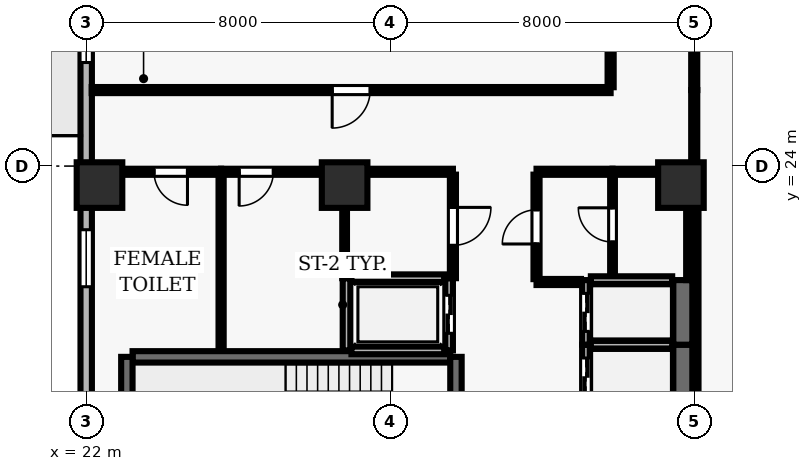
"""IFC4 building model, lengths in metres.
Left out: names, types, materials, properties, quantities, classifications, styles, units other than length and angle.
Written with IfcOpenShell. Run it as: python <this file> out.ifc"""

import sys

from ifc_helpers import new_model, si_unit, direction, frame, frame_2d, origin, origin_2d, place, context, subcontext, project, spatial, rectangle, extrude, element, fill, save


model = new_model("IFC4")
c1 = context("Model", 3, precision=1e-05, world=origin(), true_north=direction((0.0, 1.0)))
c2 = subcontext(c1, "Body", "Model", "MODEL_VIEW")
j1 = project(units=[si_unit("LENGTHUNIT", "METRE"), si_unit("PLANEANGLEUNIT", "RADIAN")], contexts=[c1])
p1 = place(None, origin())
s1 = spatial("IfcSite", under=j1, at=p1, CompositionType="ELEMENT")
p2 = place(p1, origin())
s2 = spatial("IfcBuilding", under=s1, at=p2, CompositionType="ELEMENT")
p3 = place(p2, frame((0.0, 0.0, 107.3)))
s3 = spatial("IfcBuildingStorey", under=s2, at=p3, CompositionType="ELEMENT", Elevation=107.3)
for number, where, z_axis, x_axis in (
    (1, (22.35, 23.5, 0.0), (0.0, 0.0, 1.0), (1.0, 0.0, 0.0)),
    (2, (28.8, 23.5, 0.0), (0.0, 0.0, 1.0), (1.0, 0.0, 0.0)),
    (3, (37.65, 23.5, 0.0), (0.0, 0.0, 1.0), (1.0, 0.0, 0.0)),
):
    element("IfcColumn", number, at=place(p3, frame(where, z_axis=z_axis, x_axis=x_axis)), inside=s3, PredefinedType="COLUMN", context=c2, shape_type="SweptSolid", body=[
        extrude(rectangle(XDim=1.2, YDim=1.2, at=origin_2d()), origin(), (0.0, 0.0, 1.0), 3.9),
    ])
p4 = place(p3, frame((22.0, 46.1, 0.0), z_axis=(0.0, 0.0, 1.0), x_axis=(0.0, -1.0, 0.0)))
e4 = element("IfcWall", 4, at=p4, inside=s3, PredefinedType="SOLIDWALL", context=c2, shape_type="SweptSolid", body=[
    extrude(rectangle(XDim=43.6, YDim=0.3, at=frame_2d((21.8, 0.0))), origin(), (0.0, 0.0, 1.0), 3.69),
])
p5 = place(p4, frame((7.1, 0.0, 0.0)))
e5 = element("IfcOpeningElement", 5, at=p5, cuts=e4, PredefinedType="OPENING", context=c2, shape_type="SweptSolid", body=[
    extrude(rectangle(XDim=1.0, YDim=2.2, at=frame_2d((0.5, 1.1))), frame((0.0, 0.16, 0.0), z_axis=(0.0, -1.0, 0.0), x_axis=(1.0, 0.0, 0.0)), (0.0, 0.0, 1.0), 0.32),
])
p6 = place(p4, frame((1.975, 0.0, 0.9)))
e6 = element("IfcOpeningElement", 6, at=p6, cuts=e4, PredefinedType="OPENING", context=c2, shape_type="SweptSolid", body=[
    extrude(rectangle(XDim=1.5, YDim=1.6, at=frame_2d((0.75, 0.8))), frame((0.0, 0.16, 0.0), z_axis=(0.0, -1.0, 0.0), x_axis=(1.0, 0.0, 0.0)), (0.0, 0.0, 1.0), 0.32),
])
p7 = place(p4, frame((13.325, 0.0, 0.9)))
e7 = element("IfcOpeningElement", 7, at=p7, cuts=e4, PredefinedType="OPENING", context=c2, shape_type="SweptSolid", body=[
    extrude(rectangle(XDim=1.5, YDim=1.6, at=frame_2d((0.75, 0.8))), frame((0.0, 0.16, 0.0), z_axis=(0.0, -1.0, 0.0), x_axis=(1.0, 0.0, 0.0)), (0.0, 0.0, 1.0), 0.32),
])
p8 = place(p4, frame((17.875, 0.0, 0.9)))
e8 = element("IfcOpeningElement", 8, at=p8, cuts=e4, PredefinedType="OPENING", context=c2, shape_type="SweptSolid", body=[
    extrude(rectangle(XDim=1.5, YDim=1.6, at=frame_2d((0.75, 0.8))), frame((0.0, 0.16, 0.0), z_axis=(0.0, -1.0, 0.0), x_axis=(1.0, 0.0, 0.0)), (0.0, 0.0, 1.0), 0.32),
])
p9 = place(p4, frame((23.775, 0.0, 0.9)))
e9 = element("IfcOpeningElement", 9, at=p9, cuts=e4, PredefinedType="OPENING", context=c2, shape_type="SweptSolid", body=[
    extrude(rectangle(XDim=1.5, YDim=1.6, at=frame_2d((0.75, 0.8))), frame((0.0, 0.16, 0.0), z_axis=(0.0, -1.0, 0.0), x_axis=(1.0, 0.0, 0.0)), (0.0, 0.0, 1.0), 0.32),
])
p10 = place(p4, frame((28.775, 0.0, 0.9)))
e10 = element("IfcOpeningElement", 10, at=p10, cuts=e4, PredefinedType="OPENING", context=c2, shape_type="SweptSolid", body=[
    extrude(rectangle(XDim=1.5, YDim=1.6, at=frame_2d((0.75, 0.8))), frame((0.0, 0.16, 0.0), z_axis=(0.0, -1.0, 0.0), x_axis=(1.0, 0.0, 0.0)), (0.0, 0.0, 1.0), 0.32),
])
p11 = place(p4, frame((34.675, 0.0, 0.9)))
e11 = element("IfcOpeningElement", 11, at=p11, cuts=e4, PredefinedType="OPENING", context=c2, shape_type="SweptSolid", body=[
    extrude(rectangle(XDim=1.5, YDim=1.6, at=frame_2d((0.75, 0.8))), frame((0.0, 0.16, 0.0), z_axis=(0.0, -1.0, 0.0), x_axis=(1.0, 0.0, 0.0)), (0.0, 0.0, 1.0), 0.32),
])
p12 = place(p3, frame((31.58, 18.98, 0.0), z_axis=(0.0, 0.0, 1.0), x_axis=(-1.0, 0.0, 0.0)))
e12 = element("IfcWall", 12, at=p12, inside=s3, PredefinedType="SHEAR", context=c2, shape_type="SweptSolid", body=[
    extrude(rectangle(XDim=8.36, YDim=0.3, at=frame_2d((4.18, 0.0))), origin(), (0.0, 0.0, 1.0), 3.69),
])
p13 = place(p3, frame((23.07, 18.98, 0.0), z_axis=(0.0, 0.0, 1.0), x_axis=(0.0, -1.0, 0.0)))
e13 = element("IfcWall", 13, at=p13, inside=s3, PredefinedType="SHEAR", context=c2, shape_type="SweptSolid", body=[
    extrude(rectangle(XDim=3.51, YDim=0.3, at=frame_2d((1.755, 0.0))), origin(), (0.0, 0.0, 1.0), 3.69),
])
p14 = place(p3, frame((31.73, 15.47, 0.0), z_axis=(0.0, 0.0, 1.0), x_axis=(0.0, 1.0, 0.0)))
e14 = element("IfcWall", 14, at=p14, inside=s3, PredefinedType="SHEAR", context=c2, shape_type="SweptSolid", body=[
    extrude(rectangle(XDim=3.51, YDim=0.3, at=frame_2d((1.755, 0.0))), origin(), (0.0, 0.0, 1.0), 3.69),
])
p15 = place(p14, frame((1.18, 0.0, 0.0)))
e15 = element("IfcOpeningElement", 15, at=p15, cuts=e14, PredefinedType="OPENING", context=c2, shape_type="SweptSolid", body=[
    extrude(rectangle(XDim=1.15, YDim=2.15, at=frame_2d((0.575, 1.075))), frame((0.0, 0.16, 0.0), z_axis=(0.0, -1.0, 0.0), x_axis=(1.0, 0.0, 0.0)), (0.0, 0.0, 1.0), 0.32),
])
p16 = place(p3, frame((35.15, 19.3, 0.0), z_axis=(0.0, 0.0, 1.0), x_axis=(0.0, -1.0, 0.0)))
e16 = element("IfcWall", 16, at=p16, inside=s3, PredefinedType="SOLIDWALL", context=c2, shape_type="SweptSolid", body=[
    extrude(rectangle(XDim=1.7, YDim=0.2, at=frame_2d((0.85, 0.0))), origin(), (0.0, 0.0, 1.0), 3.69),
])
p17 = place(p16, frame((0.35, 0.0, 0.0)))
e17 = element("IfcOpeningElement", 17, at=p17, cuts=e16, PredefinedType="OPENING", context=c2, shape_type="SweptSolid", body=[
    extrude(rectangle(XDim=1.0, YDim=2.1, at=frame_2d((0.5, 1.05))), frame((0.0, 0.11, 0.0), z_axis=(0.0, -1.0, 0.0), x_axis=(1.0, 0.0, 0.0)), (0.0, 0.0, 1.0), 0.22),
])
p18 = place(p3, frame((37.7, 17.6, 0.0), z_axis=(0.0, 0.0, 1.0), x_axis=(0.0, 1.0, 0.0)))
e18 = element("IfcWall", 18, at=p18, inside=s3, PredefinedType="SHEAR", context=c2, shape_type="SweptSolid", body=[
    extrude(rectangle(XDim=1.7, YDim=0.5, at=frame_2d((0.85, 0.0))), origin(), (0.0, 0.0, 1.0), 3.69),
])
p19 = place(p3, frame((37.42, 19.3, 0.0), z_axis=(0.0, 0.0, 1.0), x_axis=(-1.0, 0.0, 0.0)))
e19 = element("IfcWall", 19, at=p19, inside=s3, PredefinedType="SOLIDWALL", context=c2, shape_type="SweptSolid", body=[
    extrude(rectangle(XDim=2.14, YDim=0.2, at=frame_2d((1.07, 0.0))), origin(), (0.0, 0.0, 1.0), 3.69),
])
p20 = place(p3, frame((35.15, 21.0, 0.0), z_axis=(0.0, 0.0, 1.0), x_axis=(0.0, -1.0, 0.0)))
e20 = element("IfcWall", 20, at=p20, inside=s3, PredefinedType="SOLIDWALL", context=c2, shape_type="SweptSolid", body=[
    extrude(rectangle(XDim=1.7, YDim=0.2, at=frame_2d((0.85, 0.0))), origin(), (0.0, 0.0, 1.0), 3.69),
])
p21 = place(p20, frame((0.35, 0.0, 0.0)))
e21 = element("IfcOpeningElement", 21, at=p21, cuts=e20, PredefinedType="OPENING", context=c2, shape_type="SweptSolid", body=[
    extrude(rectangle(XDim=1.0, YDim=2.1, at=frame_2d((0.5, 1.05))), frame((0.0, 0.11, 0.0), z_axis=(0.0, -1.0, 0.0), x_axis=(1.0, 0.0, 0.0)), (0.0, 0.0, 1.0), 0.22),
])
p22 = place(p3, frame((37.7, 19.3, 0.0), z_axis=(0.0, 0.0, 1.0), x_axis=(0.0, 1.0, 0.0)))
e22 = element("IfcWall", 22, at=p22, inside=s3, PredefinedType="SHEAR", context=c2, shape_type="SweptSolid", body=[
    extrude(rectangle(XDim=1.7, YDim=0.5, at=frame_2d((0.85, 0.0))), origin(), (0.0, 0.0, 1.0), 3.69),
])
p23 = place(p3, frame((37.42, 21.0, 0.0), z_axis=(0.0, 0.0, 1.0), x_axis=(-1.0, 0.0, 0.0)))
e23 = element("IfcWall", 23, at=p23, inside=s3, PredefinedType="SOLIDWALL", context=c2, shape_type="SweptSolid", body=[
    extrude(rectangle(XDim=2.14, YDim=0.2, at=frame_2d((1.07, 0.0))), origin(), (0.0, 0.0, 1.0), 3.69),
])
p24 = place(p3, frame((28.85, 21.05, 0.0), z_axis=(0.0, 0.0, 1.0), x_axis=(0.0, -1.0, 0.0)))
e24 = element("IfcWall", 24, at=p24, inside=s3, PredefinedType="SOLIDWALL", context=c2, shape_type="SweptSolid", body=[
    extrude(rectangle(XDim=1.9, YDim=0.2, at=frame_2d((0.95, 0.0))), origin(), (0.0, 0.0, 1.0), 3.69),
])
p25 = place(p3, frame((31.55, 19.15, 0.0), z_axis=(0.0, 0.0, 1.0), x_axis=(0.0, 1.0, 0.0)))
e25 = element("IfcWall", 25, at=p25, inside=s3, PredefinedType="SOLIDWALL", context=c2, shape_type="SweptSolid", body=[
    extrude(rectangle(XDim=1.9, YDim=0.2, at=frame_2d((0.95, 0.0))), origin(), (0.0, 0.0, 1.0), 3.69),
])
p26 = place(p25, frame((0.45, 0.0, 0.0)))
e26 = element("IfcOpeningElement", 26, at=p26, cuts=e25, PredefinedType="OPENING", context=c2, shape_type="SweptSolid", body=[
    extrude(rectangle(XDim=1.0, YDim=2.1, at=frame_2d((0.5, 1.05))), frame((0.0, 0.11, 0.0), z_axis=(0.0, -1.0, 0.0), x_axis=(1.0, 0.0, 0.0)), (0.0, 0.0, 1.0), 0.22),
])
for number, where, z_axis, x_axis in (
    (27, (28.98, 19.15, 0.0), (0.0, 0.0, 1.0), (1.0, 0.0, 0.0)),
    (28, (31.42, 21.05, 0.0), (0.0, 0.0, 1.0), (-1.0, 0.0, 0.0)),
):
    element("IfcWall", number, at=place(p3, frame(where, z_axis=z_axis, x_axis=x_axis)), inside=s3, PredefinedType="SOLIDWALL", context=c2, shape_type="SweptSolid", body=[
        extrude(rectangle(XDim=2.44, YDim=0.2, at=frame_2d((1.22, 0.0))), origin(), (0.0, 0.0, 1.0), 3.69),
    ])
p27 = place(p3, frame((25.55, 23.85, 0.0), z_axis=(0.0, 0.0, 1.0), x_axis=(-1.0, 0.0, 0.0)))
e29 = element("IfcWall", 29, at=p27, inside=s3, PredefinedType="PARTITIONING", context=c2, shape_type="SweptSolid", body=[
    extrude(rectangle(XDim=3.35, YDim=0.16, at=frame_2d((1.675, 0.0))), origin(), (0.0, 0.0, 1.0), 3.073),
])
p28 = place(p27, frame((0.885, 0.0, 0.0)))
e30 = element("IfcOpeningElement", 30, at=p28, cuts=e29, PredefinedType="OPENING", context=c2, shape_type="SweptSolid", body=[
    extrude(rectangle(XDim=0.88, YDim=2.1, at=frame_2d((0.44, 1.05))), frame((0.0, 0.09, 0.0), z_axis=(0.0, -1.0, 0.0), x_axis=(1.0, 0.0, 0.0)), (0.0, 0.0, 1.0), 0.18),
])
p29 = place(p3, frame((28.8, 23.85, 0.0), z_axis=(0.0, 0.0, 1.0), x_axis=(-1.0, 0.0, 0.0)))
e31 = element("IfcWall", 31, at=p29, inside=s3, PredefinedType="PARTITIONING", context=c2, shape_type="SweptSolid", body=[
    extrude(rectangle(XDim=3.25, YDim=0.16, at=frame_2d((1.625, 0.0))), origin(), (0.0, 0.0, 1.0), 3.073),
])
p30 = place(p29, frame((1.875, 0.0, 0.0)))
e32 = element("IfcOpeningElement", 32, at=p30, cuts=e31, PredefinedType="OPENING", context=c2, shape_type="SweptSolid", body=[
    extrude(rectangle(XDim=0.9, YDim=2.1, at=frame_2d((0.45, 1.05))), frame((0.0, 0.09, 0.0), z_axis=(0.0, -1.0, 0.0), x_axis=(1.0, 0.0, 0.0)), (0.0, 0.0, 1.0), 0.18),
])
p31 = place(p3, frame((31.65, 23.85, 0.0), z_axis=(0.0, 0.0, 1.0), x_axis=(-1.0, 0.0, 0.0)))
e33 = element("IfcWall", 33, at=p31, inside=s3, PredefinedType="PARTITIONING", context=c2, shape_type="SweptSolid", body=[
    extrude(rectangle(XDim=2.85, YDim=0.16, at=frame_2d((1.425, 0.0))), origin(), (0.0, 0.0, 1.0), 3.073),
])
p32 = place(p3, frame((35.02, 20.95, 0.0), z_axis=(0.0, 0.0, 1.0), x_axis=(-1.0, 0.0, 0.0)))
e34 = element("IfcWall", 34, at=p32, inside=s3, PredefinedType="PARTITIONING", context=c2, shape_type="SweptSolid", body=[
    extrude(rectangle(XDim=1.17, YDim=0.16, at=frame_2d((0.585, 0.0))), origin(), (0.0, 0.0, 1.0), 3.69),
])
p33 = place(p3, frame((35.8, 26.0, 0.0), z_axis=(0.0, 0.0, 1.0), x_axis=(-1.0, 0.0, 0.0)))
e35 = element("IfcWall", 35, at=p33, inside=s3, PredefinedType="PARTITIONING", context=c2, shape_type="SweptSolid", body=[
    extrude(rectangle(XDim=13.655, YDim=0.16, at=frame_2d((6.828, 0.0))), origin(), (0.0, 0.0, 1.0), 3.69),
])
p34 = place(p33, frame((6.327, 0.0, 0.0)))
e36 = element("IfcOpeningElement", 36, at=p34, cuts=e35, PredefinedType="OPENING", context=c2, shape_type="SweptSolid", body=[
    extrude(rectangle(XDim=1.0, YDim=2.1, at=frame_2d((0.5, 1.05))), frame((0.0, 0.09, 0.0), z_axis=(0.0, -1.0, 0.0), x_axis=(1.0, 0.0, 0.0)), (0.0, 0.0, 1.0), 0.18),
])
for number, where, z_axis, x_axis in (
    (37, (35.85, 23.85, 0.0), (0.0, 0.0, 1.0), (-1.0, 0.0, 0.0)),
    (38, (37.85, 23.85, 0.0), (0.0, 0.0, 1.0), (-1.0, 0.0, 0.0)),
):
    element("IfcWall", number, at=place(p3, frame(where, z_axis=z_axis, x_axis=x_axis)), inside=s3, PredefinedType="PARTITIONING", context=c2, shape_type="SweptSolid", body=[
        extrude(rectangle(XDim=2.0, YDim=0.16, at=frame_2d((1.0, 0.0))), origin(), (0.0, 0.0, 1.0), 3.073),
    ])
p35 = place(p3, frame((25.55, 19.16, 0.0), z_axis=(0.0, 0.0, 1.0), x_axis=(0.0, 1.0, 0.0)))
e39 = element("IfcWall", 39, at=p35, inside=s3, PredefinedType="PARTITIONING", context=c2, shape_type="SweptSolid", body=[
    extrude(rectangle(XDim=4.615, YDim=0.135, at=frame_2d((2.308, 0.0))), origin(), (0.0, 0.0, 1.0), 3.69),
])
p36 = place(p3, frame((28.8, 23.775, 0.0), z_axis=(0.0, 0.0, 1.0), x_axis=(0.0, -1.0, 0.0)))
e40 = element("IfcWall", 40, at=p36, inside=s3, PredefinedType="PARTITIONING", context=c2, shape_type="SweptSolid", body=[
    extrude(rectangle(XDim=2.725, YDim=0.125, at=frame_2d((1.362, 0.0))), origin(), (0.0, 0.0, 1.0), 3.69),
])
p37 = place(p3, frame((31.65, 23.775, 0.0), z_axis=(0.0, 0.0, 1.0), x_axis=(0.0, -1.0, 0.0)))
e41 = element("IfcWall", 41, at=p37, inside=s3, PredefinedType="PARTITIONING", context=c2, shape_type="SweptSolid", body=[
    extrude(rectangle(XDim=2.725, YDim=0.16, at=frame_2d((1.362, 0.0))), origin(), (0.0, 0.0, 1.0), 3.69),
])
p38 = place(p37, frame((0.862, 0.0, 0.0)))
e42 = element("IfcOpeningElement", 42, at=p38, cuts=e41, PredefinedType="OPENING", context=c2, shape_type="SweptSolid", body=[
    extrude(rectangle(XDim=1.0, YDim=2.1, at=frame_2d((0.5, 1.05))), frame((0.0, 0.09, 0.0), z_axis=(0.0, -1.0, 0.0), x_axis=(1.0, 0.0, 0.0)), (0.0, 0.0, 1.0), 0.18),
])
p39 = place(p3, frame((33.85, 21.025, 0.0), z_axis=(0.0, 0.0, 1.0), x_axis=(0.0, 1.0, 0.0)))
e43 = element("IfcWall", 43, at=p39, inside=s3, PredefinedType="PARTITIONING", context=c2, shape_type="SweptSolid", body=[
    extrude(rectangle(XDim=2.75, YDim=0.16, at=frame_2d((1.375, 0.0))), origin(), (0.0, 0.0, 1.0), 3.69),
])
p40 = place(p39, frame((0.925, 0.0, 0.0)))
e44 = element("IfcOpeningElement", 44, at=p40, cuts=e43, PredefinedType="OPENING", context=c2, shape_type="SweptSolid", body=[
    extrude(rectangle(XDim=0.9, YDim=2.1, at=frame_2d((0.45, 1.05))), frame((0.0, 0.09, 0.0), z_axis=(0.0, -1.0, 0.0), x_axis=(1.0, 0.0, 0.0)), (0.0, 0.0, 1.0), 0.18),
])
p41 = place(p3, frame((35.8, 33.612, 0.0), z_axis=(0.0, 0.0, 1.0), x_axis=(0.0, -1.0, 0.0)))
e45 = element("IfcWall", 45, at=p41, inside=s3, PredefinedType="PARTITIONING", context=c2, shape_type="SweptSolid", body=[
    extrude(rectangle(XDim=7.537, YDim=0.16, at=frame_2d((3.769, 0.0))), origin(), (0.0, 0.0, 1.0), 3.69),
])
p42 = place(p3, frame((35.85, 21.13, 0.0), z_axis=(0.0, 0.0, 1.0), x_axis=(0.0, 1.0, 0.0)))
e46 = element("IfcWall", 46, at=p42, inside=s3, PredefinedType="PARTITIONING", context=c2, shape_type="SweptSolid", body=[
    extrude(rectangle(XDim=2.645, YDim=0.125, at=frame_2d((1.323, 0.0))), origin(), (0.0, 0.0, 1.0), 3.69),
])
p43 = place(p42, frame((0.872, 0.0, 0.0)))
e47 = element("IfcOpeningElement", 47, at=p43, cuts=e46, PredefinedType="OPENING", context=c2, shape_type="SweptSolid", body=[
    extrude(rectangle(XDim=0.9, YDim=2.1, at=frame_2d((0.45, 1.05))), frame((0.0, 0.073, 0.0), z_axis=(0.0, -1.0, 0.0), x_axis=(1.0, 0.0, 0.0)), (0.0, 0.0, 1.0), 0.145),
])
p44 = place(p3, frame((37.85, 21.0, 0.0), z_axis=(0.0, 0.0, 1.0), x_axis=(0.0, 1.0, 0.0)))
e48 = element("IfcWall", 48, at=p44, inside=s3, PredefinedType="PARTITIONING", context=c2, shape_type="SweptSolid", body=[
    extrude(rectangle(XDim=2.775, YDim=0.125, at=frame_2d((1.387, 0.0))), origin(), (0.0, 0.0, 1.0), 3.073),
])
p45 = place(p3, frame((38.0, 23.85, 0.0), z_axis=(0.0, 0.0, 1.0), x_axis=(0.0, 1.0, 0.0)))
e49 = element("IfcWall", 49, at=p45, inside=s3, PredefinedType="PARTITIONING", context=c2, shape_type="SweptSolid", body=[
    extrude(rectangle(XDim=2.15, YDim=0.16, at=frame_2d((1.075, 0.0))), origin(), (0.0, 0.0, 1.0), 3.073),
])
p46 = place(p3, frame((38.0, 26.0, 0.0), z_axis=(0.0, 0.0, 1.0), x_axis=(0.0, 1.0, 0.0)))
e50 = element("IfcWall", 50, at=p46, inside=s3, PredefinedType="PARTITIONING", context=c2, shape_type="SweptSolid", body=[
    extrude(rectangle(XDim=4.655, YDim=0.16, at=frame_2d((2.328, 0.0))), origin(), (0.0, 0.0, 1.0), 3.073),
])
p47 = place(p3, frame((38.05, 23.85, 0.0), z_axis=(0.0, 0.0, 1.0), x_axis=(0.0, -1.0, 0.0)))
e51 = element("IfcWall", 51, at=p47, inside=s3, PredefinedType="PARTITIONING", context=c2, shape_type="SweptSolid", body=[
    extrude(rectangle(XDim=7.775, YDim=0.125, at=frame_2d((3.888, 0.0))), origin(), (0.0, 0.0, 1.0), 3.073),
])
p48 = place(p8, origin())
e52 = element("IfcWindow", 52, at=p48, inside=s3, PartitioningType="SINGLE_PANEL", PredefinedType="WINDOW", context=c2, shape_type="SweptSolid", body=[
    extrude(rectangle(XDim=1.5, YDim=1.6, at=frame_2d((0.75, 0.8))), frame((0.0, 0.03, 0.0), z_axis=(0.0, -1.0, 0.0), x_axis=(1.0, 0.0, 0.0)), (0.0, 0.0, 1.0), 0.06),
])
fill(e8, e52)
p49 = place(p9, origin())
e53 = element("IfcWindow", 53, at=p49, inside=s3, PartitioningType="SINGLE_PANEL", PredefinedType="WINDOW", context=c2, shape_type="SweptSolid", body=[
    extrude(rectangle(XDim=1.5, YDim=1.6, at=frame_2d((0.75, 0.8))), frame((0.0, 0.03, 0.0), z_axis=(0.0, -1.0, 0.0), x_axis=(1.0, 0.0, 0.0)), (0.0, 0.0, 1.0), 0.06),
])
fill(e9, e53)
p50 = place(p17, origin())
e54 = element("IfcDoor", 54, at=p50, inside=s3, OperationType="DOUBLE_DOOR_SLIDING", PredefinedType="DOOR", context=c2, shape_type="SweptSolid", body=[
    extrude(rectangle(XDim=1.0, YDim=2.1, at=frame_2d((0.5, 1.05))), frame((0.0, 0.025, 0.0), z_axis=(0.0, -1.0, 0.0), x_axis=(1.0, 0.0, 0.0)), (0.0, 0.0, 1.0), 0.05),
])
fill(e17, e54)
p51 = place(p21, origin())
e55 = element("IfcDoor", 55, at=p51, inside=s3, OperationType="DOUBLE_DOOR_SLIDING", PredefinedType="DOOR", context=c2, shape_type="SweptSolid", body=[
    extrude(rectangle(XDim=1.0, YDim=2.1, at=frame_2d((0.5, 1.05))), frame((0.0, 0.025, 0.0), z_axis=(0.0, -1.0, 0.0), x_axis=(1.0, 0.0, 0.0)), (0.0, 0.0, 1.0), 0.05),
])
fill(e21, e55)
p52 = place(p26, origin())
e56 = element("IfcDoor", 56, at=p52, inside=s3, OperationType="DOUBLE_DOOR_SLIDING", PredefinedType="DOOR", context=c2, shape_type="SweptSolid", body=[
    extrude(rectangle(XDim=1.0, YDim=2.1, at=frame_2d((0.5, 1.05))), frame((0.0, 0.025, 0.0), z_axis=(0.0, -1.0, 0.0), x_axis=(1.0, 0.0, 0.0)), (0.0, 0.0, 1.0), 0.05),
])
fill(e26, e56)
p53 = place(p40, origin())
e57 = element("IfcDoor", 57, at=p53, inside=s3, OperationType="SINGLE_SWING_LEFT", PredefinedType="DOOR", context=c2, shape_type="SweptSolid", body=[
    extrude(rectangle(XDim=0.9, YDim=2.1, at=frame_2d((0.45, 1.05))), frame((0.0, 0.025, 0.0), z_axis=(0.0, -1.0, 0.0), x_axis=(1.0, 0.0, 0.0)), (0.0, 0.0, 1.0), 0.05),
])
fill(e44, e57)
p54 = place(p43, origin())
e58 = element("IfcDoor", 58, at=p54, inside=s3, OperationType="SINGLE_SWING_RIGHT", PredefinedType="DOOR", context=c2, shape_type="SweptSolid", body=[
    extrude(rectangle(XDim=0.9, YDim=2.1, at=frame_2d((0.45, 1.05))), frame((0.0, 0.025, 0.0), z_axis=(0.0, -1.0, 0.0), x_axis=(1.0, 0.0, 0.0)), (0.0, 0.0, 1.0), 0.05),
])
fill(e47, e58)
p55 = place(p38, origin())
e59 = element("IfcDoor", 59, at=p55, inside=s3, OperationType="SINGLE_SWING_LEFT", PredefinedType="DOOR", context=c2, shape_type="SweptSolid", body=[
    extrude(rectangle(XDim=1.0, YDim=2.1, at=frame_2d((0.5, 1.05))), frame((0.0, 0.025, 0.0), z_axis=(0.0, -1.0, 0.0), x_axis=(1.0, 0.0, 0.0)), (0.0, 0.0, 1.0), 0.05),
])
fill(e42, e59)
p56 = place(p28, origin())
e60 = element("IfcDoor", 60, at=p56, inside=s3, OperationType="SINGLE_SWING_LEFT", PredefinedType="DOOR", context=c2, shape_type="SweptSolid", body=[
    extrude(rectangle(XDim=0.88, YDim=2.1, at=frame_2d((0.44, 1.05))), frame((0.0, 0.025, 0.0), z_axis=(0.0, -1.0, 0.0), x_axis=(1.0, 0.0, 0.0)), (0.0, 0.0, 1.0), 0.05),
])
fill(e30, e60)
p57 = place(p30, origin())
e61 = element("IfcDoor", 61, at=p57, inside=s3, OperationType="SINGLE_SWING_RIGHT", PredefinedType="DOOR", context=c2, shape_type="SweptSolid", body=[
    extrude(rectangle(XDim=0.9, YDim=2.1, at=frame_2d((0.45, 1.05))), frame((0.0, 0.025, 0.0), z_axis=(0.0, -1.0, 0.0), x_axis=(1.0, 0.0, 0.0)), (0.0, 0.0, 1.0), 0.05),
])
fill(e32, e61)
p58 = place(p34, origin())
e62 = element("IfcDoor", 62, at=p58, inside=s3, OperationType="SINGLE_SWING_RIGHT", PredefinedType="DOOR", context=c2, shape_type="SweptSolid", body=[
    extrude(rectangle(XDim=1.0, YDim=2.1, at=frame_2d((0.5, 1.05))), frame((0.0, 0.025, 0.0), z_axis=(0.0, -1.0, 0.0), x_axis=(1.0, 0.0, 0.0)), (0.0, 0.0, 1.0), 0.05),
])
fill(e36, e62)
save(model, sys.argv[1])
